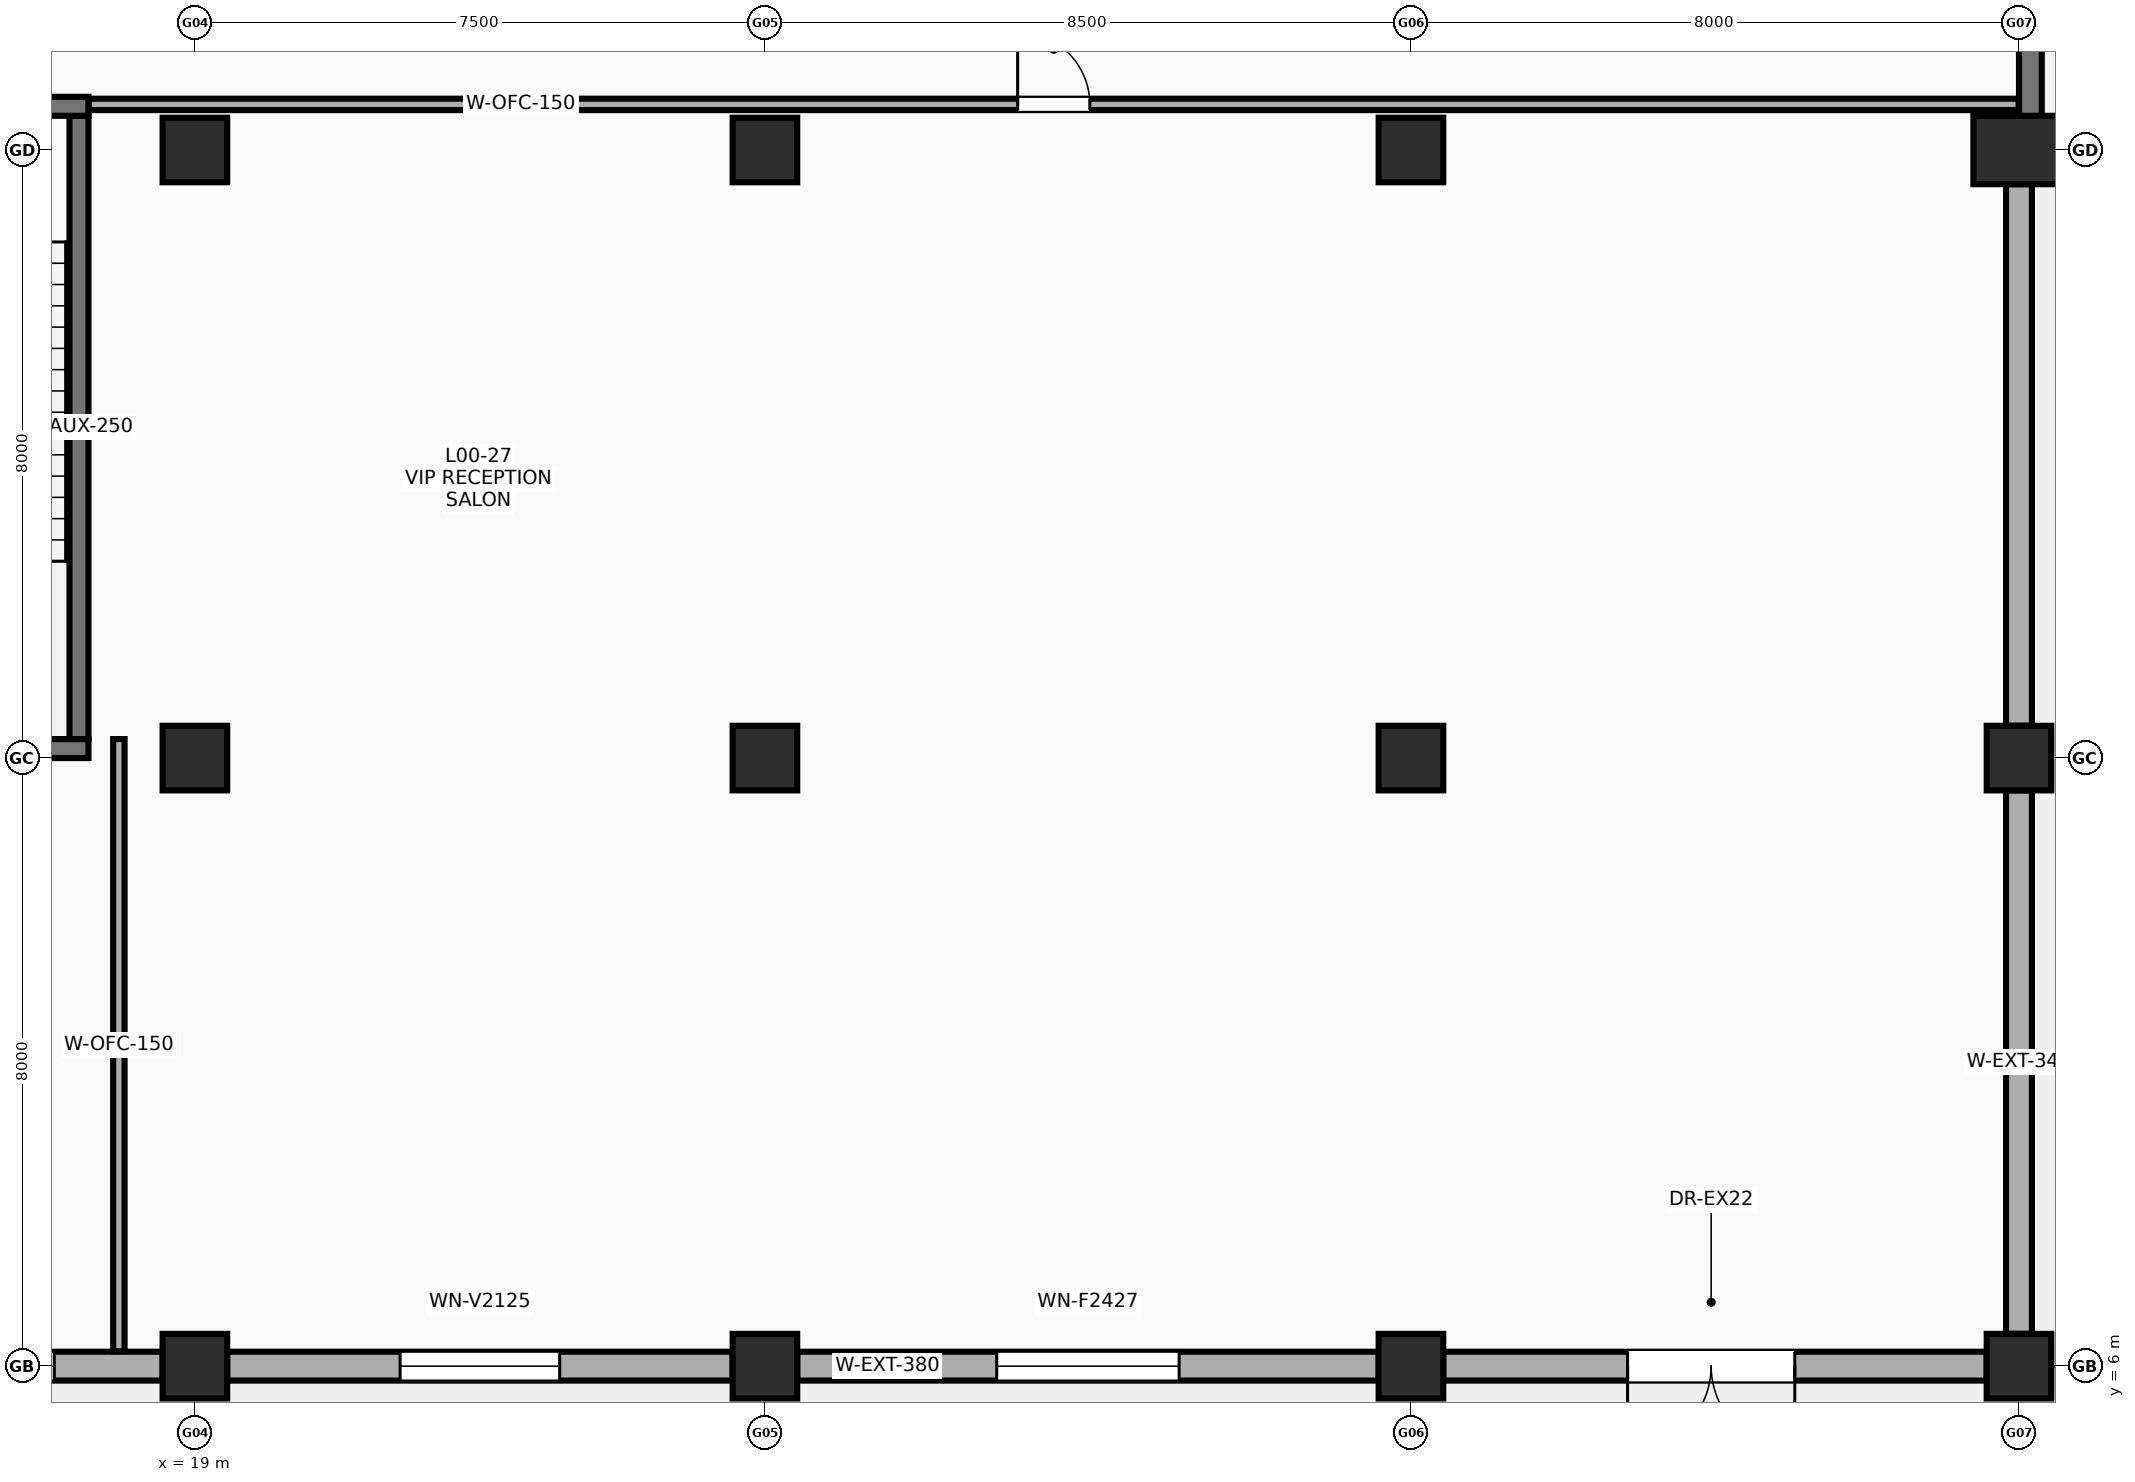
"""IFC4 building model, lengths in metres.
Left out: names, types, materials, properties, quantities, classifications, styles, units other than length and angle.
Written with IfcOpenShell. Run it as: python <this file> out.ifc"""

import sys

from ifc_helpers import new_model, si_unit, direction, frame, frame_2d, origin, origin_2d, place, context, subcontext, project, spatial, rectangle, extrude, element, fill, save


model = new_model("IFC4")
c1 = context("Model", 3, precision=1e-05, world=origin(), true_north=direction((0.0, 1.0)))
c2 = subcontext(c1, "Body", "Model", "MODEL_VIEW")
j1 = project(units=[si_unit("LENGTHUNIT", "METRE"), si_unit("PLANEANGLEUNIT", "RADIAN")], contexts=[c1])
p1 = place(None, origin())
s1 = spatial("IfcSite", under=j1, at=p1, CompositionType="ELEMENT")
p2 = place(p1, origin())
s2 = spatial("IfcBuilding", under=s1, at=p2, CompositionType="ELEMENT")
p3 = place(p2, origin())
s3 = spatial("IfcBuildingStorey", under=s2, at=p3, CompositionType="ELEMENT", Elevation=0.0)
for number, where, z_axis, x_axis in (
    (1, (19.0, 6.0, 0.0), (0.0, 0.0, 1.0), (1.0, 0.0, 0.0)),
    (2, (19.0, 14.0, 0.0), (0.0, 0.0, 1.0), (1.0, 0.0, 0.0)),
    (3, (19.0, 22.0, 0.0), (0.0, 0.0, 1.0), (1.0, 0.0, 0.0)),
    (4, (26.5, 6.0, 0.0), (0.0, 0.0, 1.0), (1.0, 0.0, 0.0)),
    (5, (26.5, 14.0, 0.0), (0.0, 0.0, 1.0), (1.0, 0.0, 0.0)),
    (6, (26.5, 22.0, 0.0), (0.0, 0.0, 1.0), (1.0, 0.0, 0.0)),
    (7, (35.0, 6.0, 0.0), (0.0, 0.0, 1.0), (1.0, 0.0, 0.0)),
    (8, (35.0, 14.0, 0.0), (0.0, 0.0, 1.0), (1.0, 0.0, 0.0)),
    (9, (35.0, 22.0, 0.0), (0.0, 0.0, 1.0), (1.0, 0.0, 0.0)),
    (10, (43.0, 6.0, 0.0), (0.0, 0.0, 1.0), (1.0, 0.0, 0.0)),
    (11, (43.0, 14.0, 0.0), (0.0, 0.0, 1.0), (1.0, 0.0, 0.0)),
):
    element("IfcColumn", number, at=place(p3, frame(where, z_axis=z_axis, x_axis=x_axis)), inside=s3, PredefinedType="COLUMN", context=c2, shape_type="SweptSolid", body=[
        extrude(rectangle(XDim=0.85, YDim=0.85, at=origin_2d()), origin(), (0.0, 0.0, 1.0), 5.4),
    ])
p4 = place(p3, frame((43.0, 22.0, 0.0), z_axis=(0.0, 0.0, 1.0), x_axis=(1.0, 0.0, 0.0)))
e12 = element("IfcColumn", 12, at=p4, inside=s3, PredefinedType="COLUMN", context=c2, shape_type="SweptSolid", body=[
    extrude(rectangle(XDim=1.2, YDim=0.9, at=origin_2d()), origin(), (0.0, 0.0, 1.0), 5.4),
])
p5 = place(p3, frame((43.0, 22.15, 0.0), z_axis=(0.0, 0.0, 1.0), x_axis=(1.0, 0.0, 0.0)))
e13 = element("IfcWall", 13, at=p5, inside=s3, PredefinedType="SHEAR", context=c2, shape_type="SweptSolid", body=[
    extrude(rectangle(XDim=7.5, YDim=0.3, at=frame_2d((3.75, 0.0))), origin(), (0.0, 0.0, 1.0), 5.4),
])
p6 = place(p3, frame((43.15, 22.3, 0.0), z_axis=(0.0, 0.0, 1.0), x_axis=(0.0, 1.0, 0.0)))
e14 = element("IfcWall", 14, at=p6, inside=s3, PredefinedType="SHEAR", context=c2, shape_type="SweptSolid", body=[
    extrude(rectangle(XDim=8.2, YDim=0.3, at=frame_2d((4.1, 0.0))), origin(), (0.0, 0.0, 1.0), 5.4),
])
p7 = place(p3, frame((13.925, 6.0, 0.0), z_axis=(0.0, 0.0, 1.0), x_axis=(1.0, 0.0, 0.0)))
e15 = element("IfcWall", 15, at=p7, inside=s3, PredefinedType="SOLIDWALL", context=c2, shape_type="SweptSolid", body=[
    extrude(rectangle(XDim=4.65, YDim=0.38, at=frame_2d((2.325, 0.0))), origin(), (0.0, 0.0, 1.0), 3.9),
])
p8 = place(p7, frame((1.425, 0.0, 0.85)))
e16 = element("IfcOpeningElement", 16, at=p8, cuts=e15, PredefinedType="OPENING", context=c2, shape_type="SweptSolid", body=[
    extrude(rectangle(XDim=1.8, YDim=2.2, at=frame_2d((0.9, 1.1))), frame((0.0, 0.2, 0.0), z_axis=(0.0, -1.0, 0.0), x_axis=(1.0, 0.0, 0.0)), (0.0, 0.0, 1.0), 0.4),
])
p9 = place(p3, frame((19.425, 6.0, 0.0), z_axis=(0.0, 0.0, 1.0), x_axis=(1.0, 0.0, 0.0)))
e17 = element("IfcWall", 17, at=p9, inside=s3, PredefinedType="SOLIDWALL", context=c2, shape_type="SweptSolid", body=[
    extrude(rectangle(XDim=6.65, YDim=0.38, at=frame_2d((3.325, 0.0))), origin(), (0.0, 0.0, 1.0), 4.15),
])
p10 = place(p9, frame((2.275, 0.0, 0.85)))
e18 = element("IfcOpeningElement", 18, at=p10, cuts=e17, PredefinedType="OPENING", context=c2, shape_type="SweptSolid", body=[
    extrude(rectangle(XDim=2.1, YDim=2.5, at=frame_2d((1.05, 1.25))), frame((0.0, 0.2, 0.0), z_axis=(0.0, -1.0, 0.0), x_axis=(1.0, 0.0, 0.0)), (0.0, 0.0, 1.0), 0.4),
])
p11 = place(p3, frame((26.925, 6.0, 0.0), z_axis=(0.0, 0.0, 1.0), x_axis=(1.0, 0.0, 0.0)))
e19 = element("IfcWall", 19, at=p11, inside=s3, PredefinedType="SOLIDWALL", context=c2, shape_type="SweptSolid", body=[
    extrude(rectangle(XDim=7.65, YDim=0.38, at=frame_2d((3.825, 0.0))), origin(), (0.0, 0.0, 1.0), 4.15),
])
p12 = place(p11, frame((2.625, 0.0, 0.85)))
e20 = element("IfcOpeningElement", 20, at=p12, cuts=e19, PredefinedType="OPENING", context=c2, shape_type="SweptSolid", body=[
    extrude(rectangle(XDim=2.4, YDim=2.7, at=frame_2d((1.2, 1.35))), frame((0.0, 0.2, 0.0), z_axis=(0.0, -1.0, 0.0), x_axis=(1.0, 0.0, 0.0)), (0.0, 0.0, 1.0), 0.4),
])
p13 = place(p3, frame((35.425, 6.0, 0.0), z_axis=(0.0, 0.0, 1.0), x_axis=(1.0, 0.0, 0.0)))
e21 = element("IfcWall", 21, at=p13, inside=s3, PredefinedType="SOLIDWALL", context=c2, shape_type="SweptSolid", body=[
    extrude(rectangle(XDim=7.15, YDim=0.38, at=frame_2d((3.575, 0.0))), origin(), (0.0, 0.0, 1.0), 4.15),
])
p14 = place(p13, frame((4.625, 0.0, 0.0), z_axis=(0.0, 0.0, 1.0), x_axis=(-1.0, 0.0, 0.0)))
e22 = element("IfcOpeningElement", 22, at=p14, cuts=e21, PredefinedType="OPENING", context=c2, shape_type="SweptSolid", body=[
    extrude(rectangle(XDim=2.2, YDim=2.6, at=frame_2d((1.1, 1.3))), frame((0.0, 0.2, 0.0), z_axis=(0.0, -1.0, 0.0), x_axis=(1.0, 0.0, 0.0)), (0.0, 0.0, 1.0), 0.4),
])
p15 = place(p3, frame((43.0, 6.425, 0.0), z_axis=(0.0, 0.0, 1.0), x_axis=(0.0, 1.0, 0.0)))
e23 = element("IfcWall", 23, at=p15, inside=s3, PredefinedType="SOLIDWALL", context=c2, shape_type="SweptSolid", body=[
    extrude(rectangle(XDim=7.15, YDim=0.34, at=frame_2d((3.575, 0.0))), origin(), (0.0, 0.0, 1.0), 4.15),
])
p16 = place(p3, frame((43.0, 14.425, 0.0), z_axis=(0.0, 0.0, 1.0), x_axis=(0.0, 1.0, 0.0)))
e24 = element("IfcWall", 24, at=p16, inside=s3, PredefinedType="SOLIDWALL", context=c2, shape_type="SweptSolid", body=[
    extrude(rectangle(XDim=7.125, YDim=0.34, at=frame_2d((3.562, 0.0))), origin(), (0.0, 0.0, 1.0), 4.15),
])
p17 = place(p3, frame((13.5, 14.125, 0.0), z_axis=(0.0, 0.0, 1.0), x_axis=(1.0, 0.0, 0.0)))
e25 = element("IfcWall", 25, at=p17, inside=s3, PredefinedType="SHEAR", context=c2, shape_type="SweptSolid", body=[
    extrude(rectangle(XDim=4.1, YDim=0.25, at=frame_2d((2.05, 0.0))), origin(), (0.0, 0.0, 1.0), 5.4),
])
p18 = place(p3, frame((17.475, 14.25, 0.0), z_axis=(0.0, 0.0, 1.0), x_axis=(0.0, 1.0, 0.0)))
e26 = element("IfcWall", 26, at=p18, inside=s3, PredefinedType="SHEAR", context=c2, shape_type="SweptSolid", body=[
    extrude(rectangle(XDim=8.2, YDim=0.25, at=frame_2d((4.1, 0.0))), origin(), (0.0, 0.0, 1.0), 5.4),
])
p19 = place(p3, frame((13.5, 22.575, 0.0), z_axis=(0.0, 0.0, 1.0), x_axis=(1.0, 0.0, 0.0)))
e27 = element("IfcWall", 27, at=p19, inside=s3, PredefinedType="SHEAR", context=c2, shape_type="SweptSolid", body=[
    extrude(rectangle(XDim=4.1, YDim=0.25, at=frame_2d((2.05, 0.0))), origin(), (0.0, 0.0, 1.0), 5.4),
])
p20 = place(p19, frame((1.45, 0.0, 0.0)))
e28 = element("IfcOpeningElement", 28, at=p20, cuts=e27, PredefinedType="OPENING", context=c2, shape_type="SweptSolid", body=[
    extrude(rectangle(XDim=1.2, YDim=2.15, at=frame_2d((0.6, 1.075))), frame((0.0, 0.135, 0.0), z_axis=(0.0, -1.0, 0.0), x_axis=(1.0, 0.0, 0.0)), (0.0, 0.0, 1.0), 0.27),
])
p21 = place(p3, frame((17.605, 22.6, 0.0), z_axis=(0.0, 0.0, 1.0), x_axis=(1.0, 0.0, 0.0)))
e29 = element("IfcWall", 29, at=p21, inside=s3, PredefinedType="PARTITIONING", context=c2, shape_type="SweptSolid", body=[
    extrude(rectangle(XDim=25.39, YDim=0.15, at=frame_2d((12.695, 0.0))), origin(), (0.0, 0.0, 1.0), 4.4),
])
p22 = place(p21, frame((12.22, 0.0, 0.0)))
e30 = element("IfcOpeningElement", 30, at=p22, cuts=e29, PredefinedType="OPENING", context=c2, shape_type="SweptSolid", body=[
    extrude(rectangle(XDim=0.95, YDim=2.15, at=frame_2d((0.475, 1.075))), frame((0.0, 0.085, 0.0), z_axis=(0.0, -1.0, 0.0), x_axis=(1.0, 0.0, 0.0)), (0.0, 0.0, 1.0), 0.17),
])
p23 = place(p3, frame((18.0, 6.195, 0.0), z_axis=(0.0, 0.0, 1.0), x_axis=(0.0, 1.0, 0.0)))
e31 = element("IfcWall", 31, at=p23, inside=s3, PredefinedType="PARTITIONING", context=c2, shape_type="SweptSolid", body=[
    extrude(rectangle(XDim=8.055, YDim=0.15, at=frame_2d((4.027, 0.0))), origin(), (0.0, 0.0, 1.0), 4.1),
])
p24 = place(p8, origin())
e32 = element("IfcWindow", 32, at=p24, inside=s3, PartitioningType="SINGLE_PANEL", PredefinedType="WINDOW", context=c2, shape_type="SweptSolid", body=[
    extrude(rectangle(XDim=1.8, YDim=2.2, at=frame_2d((0.9, 1.1))), frame((0.0, 0.03, 0.0), z_axis=(0.0, -1.0, 0.0), x_axis=(1.0, 0.0, 0.0)), (0.0, 0.0, 1.0), 0.06),
])
fill(e16, e32)
p25 = place(p10, origin())
e33 = element("IfcWindow", 33, at=p25, inside=s3, PartitioningType="SINGLE_PANEL", PredefinedType="WINDOW", context=c2, shape_type="SweptSolid", body=[
    extrude(rectangle(XDim=2.1, YDim=2.5, at=frame_2d((1.05, 1.25))), frame((0.0, 0.03, 0.0), z_axis=(0.0, -1.0, 0.0), x_axis=(1.0, 0.0, 0.0)), (0.0, 0.0, 1.0), 0.06),
])
fill(e18, e33)
p26 = place(p12, origin())
e34 = element("IfcWindow", 34, at=p26, inside=s3, PartitioningType="SINGLE_PANEL", PredefinedType="WINDOW", context=c2, shape_type="SweptSolid", body=[
    extrude(rectangle(XDim=2.4, YDim=2.7, at=frame_2d((1.2, 1.35))), frame((0.0, 0.03, 0.0), z_axis=(0.0, -1.0, 0.0), x_axis=(1.0, 0.0, 0.0)), (0.0, 0.0, 1.0), 0.06),
])
fill(e20, e34)
p27 = place(p14, origin())
e35 = element("IfcDoor", 35, at=p27, inside=s3, OperationType="DOUBLE_DOOR_SINGLE_SWING", PredefinedType="DOOR", context=c2, shape_type="SweptSolid", body=[
    extrude(rectangle(XDim=2.2, YDim=2.6, at=frame_2d((1.1, 1.3))), frame((0.0, 0.025, 0.0), z_axis=(0.0, -1.0, 0.0), x_axis=(1.0, 0.0, 0.0)), (0.0, 0.0, 1.0), 0.05),
])
fill(e22, e35)
p28 = place(p22, origin())
e36 = element("IfcDoor", 36, at=p28, inside=s3, OperationType="SINGLE_SWING_LEFT", PredefinedType="DOOR", context=c2, shape_type="SweptSolid", body=[
    extrude(rectangle(XDim=0.95, YDim=2.15, at=frame_2d((0.475, 1.075))), frame((0.0, 0.025, 0.0), z_axis=(0.0, -1.0, 0.0), x_axis=(1.0, 0.0, 0.0)), (0.0, 0.0, 1.0), 0.05),
])
fill(e30, e36)
save(model, sys.argv[1])
